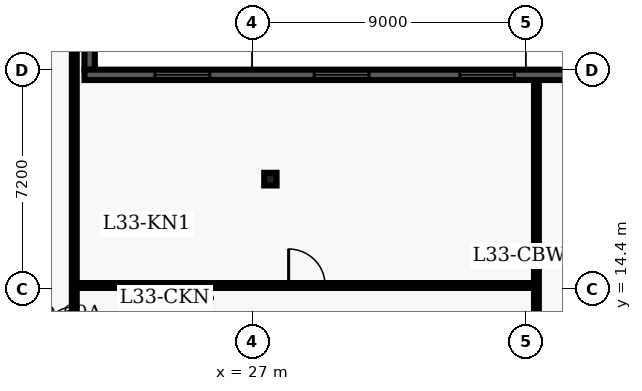
"""IFC4 building model, lengths in metres.
Left out: names, types, materials, properties, quantities, classifications, styles, units other than length and angle.
Written with IfcOpenShell. Run it as: python <this file> out.ifc"""

import sys

from ifc_helpers import new_model, entity, si_unit, converted_unit, direction, frame, origin_with_axes, origin_2d_with_axis, place, context, subcontext, project, spatial, polyline, rectangle, i_section, outline, extrude, element, fill, save


model = new_model("IFC4")
c1 = context("Model", 3, precision=1e-05, world=origin_with_axes(), true_north=direction((0.0, 1.0)))
c2 = subcontext(c1, "Body", "Model", "MODEL_VIEW")
j1 = project(units=[si_unit("LENGTHUNIT", "METRE"), converted_unit("PLANEANGLEUNIT", "DEGREE", entity("IfcPlaneAngleMeasure", 0.017), si_unit("PLANEANGLEUNIT", "RADIAN"), dimensions=[0, 0, 0, 0, 0, 0, 0])], contexts=[c1])
p1 = place(None, origin_with_axes())
s1 = spatial("IfcSite", under=j1, at=p1, CompositionType="ELEMENT")
p2 = place(p1, origin_with_axes())
s2 = spatial("IfcBuilding", under=s1, at=p2, CompositionType="ELEMENT")
p3 = place(p2, frame((0.0, 0.0, 136.8), z_axis=(0.0, 0.0, 1.0), x_axis=(1.0, 0.0, 0.0)))
s3 = spatial("IfcBuildingStorey", under=s2, at=p3, CompositionType="ELEMENT", Elevation=136.8)
p4 = place(p3, frame((27.6, 18.0, 0.0), z_axis=(0.0, 0.0, 1.0), x_axis=(1.0, 0.0, 0.0)))
e1 = element("IfcColumn", 1, at=p4, inside=s3, PredefinedType="COLUMN", context=c2, shape_type="SweptSolid", body=[
    extrude(i_section(OverallWidth=0.406, OverallDepth=0.416, WebThickness=0.03, FlangeThickness=0.048, FilletRadius=0.022, at=origin_2d_with_axis()), origin_with_axes(), (0.0, 0.0, 1.0), 3.9),
])
p5 = place(p3, frame((21.15, 7.8, 0.0), z_axis=(0.0, 0.0, 1.0), x_axis=(0.0, 1.0, 0.0)))
e2 = element("IfcWall", 2, at=p5, inside=s3, PredefinedType="PARTITIONING", context=c2, shape_type="SweptSolid", body=[
    extrude(outline(polyline([(0.0, -0.08), (32.7, -0.08), (32.7, 0.08), (0.0, 0.08), (0.0, -0.08)])), origin_with_axes(), (0.0, 0.0, 1.0), 2.7),
])
p6 = place(p5, frame((5.475, 0.0, 0.0), z_axis=(0.0, 0.0, 1.0), x_axis=(1.0, 0.0, 0.0)))
e3 = element("IfcOpeningElement", 3, at=p6, cuts=e2, PredefinedType="OPENING", context=c2, shape_type="SweptSolid", body=[
    extrude(rectangle(XDim=1.05, YDim=0.18, at=origin_2d_with_axis()), origin_with_axes(), (0.0, 0.0, 1.0), 2.15),
])
p7 = place(p3, frame((21.15, 14.5, 0.0), z_axis=(0.0, 0.0, 1.0), x_axis=(1.0, 0.0, 0.0)))
e4 = element("IfcWall", 4, at=p7, inside=s3, PredefinedType="PARTITIONING", context=c2, shape_type="SweptSolid", body=[
    extrude(outline(polyline([(0.0, -0.08), (15.2, -0.08), (15.2, 0.08), (0.0, 0.08), (0.0, -0.08)])), origin_with_axes(), (0.0, 0.0, 1.0), 2.7),
])
p8 = place(p7, frame((7.65, 0.0, 0.0), z_axis=(0.0, 0.0, 1.0), x_axis=(1.0, 0.0, 0.0)))
e5 = element("IfcOpeningElement", 5, at=p8, cuts=e4, PredefinedType="OPENING", context=c2, shape_type="SweptSolid", body=[
    extrude(rectangle(XDim=1.2, YDim=0.18, at=origin_2d_with_axis()), origin_with_axes(), (0.0, 0.0, 1.0), 2.2),
])
p9 = place(p3, frame((36.35, 4.35, 0.0), z_axis=(0.0, 0.0, 1.0), x_axis=(0.0, 1.0, 0.0)))
e6 = element("IfcWall", 6, at=p9, inside=s3, PredefinedType="PARTITIONING", context=c2, shape_type="SweptSolid", body=[
    extrude(outline(polyline([(0.0, -0.08), (16.95, -0.08), (16.95, 0.08), (0.0, 0.08), (0.0, -0.08)])), origin_with_axes(), (0.0, 0.0, 1.0), 2.7),
])
p10 = place(p3, frame((21.655, 46.58, 0.0), z_axis=(0.0, 0.0, 1.0), x_axis=(0.0, -1.0, 0.0)))
e7 = element("IfcWall", 7, at=p10, inside=s3, PredefinedType="SOLIDWALL", context=c2, shape_type="SweptSolid", body=[
    extrude(outline(polyline([(0.0, -0.17), (24.98, -0.17), (24.98, 0.17), (0.0, 0.17), (0.0, -0.17)])), origin_with_axes(), (0.0, 0.0, 1.0), 3.66),
])
p11 = place(p10, frame((2.978, 0.0, 0.45), z_axis=(0.0, 0.0, 1.0), x_axis=(1.0, 0.0, 0.0)))
e8 = element("IfcOpeningElement", 8, at=p11, cuts=e7, PredefinedType="OPENING", context=c2, shape_type="SweptSolid", body=[
    extrude(rectangle(XDim=1.6, YDim=0.36, at=origin_2d_with_axis()), origin_with_axes(), (0.0, 0.0, 1.0), 2.2),
])
p12 = place(p3, frame((21.485, 21.43, 0.0), z_axis=(0.0, 0.0, 1.0), x_axis=(1.0, 0.0, 0.0)))
e9 = element("IfcWall", 9, at=p12, inside=s3, PredefinedType="SOLIDWALL", context=c2, shape_type="SweptSolid", body=[
    extrude(outline(polyline([(0.0, -0.17), (16.915, -0.17), (16.915, 0.17), (0.0, 0.17), (0.0, -0.17)])), origin_with_axes(), (0.0, 0.0, 1.0), 3.66),
])
p13 = place(p12, frame((3.219, 0.0, 0.45), z_axis=(0.0, 0.0, 1.0), x_axis=(1.0, 0.0, 0.0)))
e10 = element("IfcOpeningElement", 10, at=p13, cuts=e9, PredefinedType="OPENING", context=c2, shape_type="SweptSolid", body=[
    extrude(rectangle(XDim=1.8, YDim=0.36, at=origin_2d_with_axis()), origin_with_axes(), (0.0, 0.0, 1.0), 2.1),
])
p14 = place(p12, frame((8.457, 0.0, 0.45), z_axis=(0.0, 0.0, 1.0), x_axis=(1.0, 0.0, 0.0)))
e11 = element("IfcOpeningElement", 11, at=p14, cuts=e9, PredefinedType="OPENING", context=c2, shape_type="SweptSolid", body=[
    extrude(rectangle(XDim=1.8, YDim=0.36, at=origin_2d_with_axis()), origin_with_axes(), (0.0, 0.0, 1.0), 2.1),
])
p15 = place(p12, frame((13.246, 0.0, 0.45), z_axis=(0.0, 0.0, 1.0), x_axis=(1.0, 0.0, 0.0)))
e12 = element("IfcOpeningElement", 12, at=p15, cuts=e9, PredefinedType="OPENING", context=c2, shape_type="SweptSolid", body=[
    extrude(rectangle(XDim=1.8, YDim=0.36, at=origin_2d_with_axis()), origin_with_axes(), (0.0, 0.0, 1.0), 2.1),
])
p16 = place(p5, frame((5.475, 0.0, 0.0), z_axis=(0.0, 0.0, 1.0), x_axis=(1.0, 0.0, 0.0)))
e13 = element("IfcDoor", 13, at=p16, inside=s3, OperationType="SINGLE_SWING_LEFT", PredefinedType="DOOR", context=c2, shape_type="SweptSolid", body=[
    extrude(rectangle(XDim=1.05, YDim=0.09, at=origin_2d_with_axis()), origin_with_axes(), (0.0, 0.0, 1.0), 2.15),
])
fill(e3, e13)
p17 = place(p7, frame((7.65, 0.0, 0.0), z_axis=(0.0, 0.0, 1.0), x_axis=(1.0, 0.0, 0.0)))
e14 = element("IfcDoor", 14, at=p17, inside=s3, OperationType="SINGLE_SWING_LEFT", PredefinedType="DOOR", context=c2, shape_type="SweptSolid", body=[
    extrude(rectangle(XDim=1.2, YDim=0.09, at=origin_2d_with_axis()), origin_with_axes(), (0.0, 0.0, 1.0), 2.2),
])
fill(e5, e14)
p18 = place(p12, frame((3.219, 0.0, 0.45), z_axis=(0.0, 0.0, 1.0), x_axis=(1.0, 0.0, 0.0)))
e15 = element("IfcWindow", 15, at=p18, inside=s3, PredefinedType="WINDOW", context=c2, shape_type="SweptSolid", body=[
    extrude(rectangle(XDim=1.8, YDim=0.09, at=origin_2d_with_axis()), origin_with_axes(), (0.0, 0.0, 1.0), 2.1),
])
fill(e10, e15)
p19 = place(p12, frame((8.457, 0.0, 0.45), z_axis=(0.0, 0.0, 1.0), x_axis=(1.0, 0.0, 0.0)))
e16 = element("IfcWindow", 16, at=p19, inside=s3, PredefinedType="WINDOW", context=c2, shape_type="SweptSolid", body=[
    extrude(rectangle(XDim=1.8, YDim=0.09, at=origin_2d_with_axis()), origin_with_axes(), (0.0, 0.0, 1.0), 2.1),
])
fill(e11, e16)
p20 = place(p12, frame((13.246, 0.0, 0.45), z_axis=(0.0, 0.0, 1.0), x_axis=(1.0, 0.0, 0.0)))
e17 = element("IfcWindow", 17, at=p20, inside=s3, PredefinedType="WINDOW", context=c2, shape_type="SweptSolid", body=[
    extrude(rectangle(XDim=1.8, YDim=0.09, at=origin_2d_with_axis()), origin_with_axes(), (0.0, 0.0, 1.0), 2.1),
])
fill(e12, e17)
save(model, sys.argv[1])
